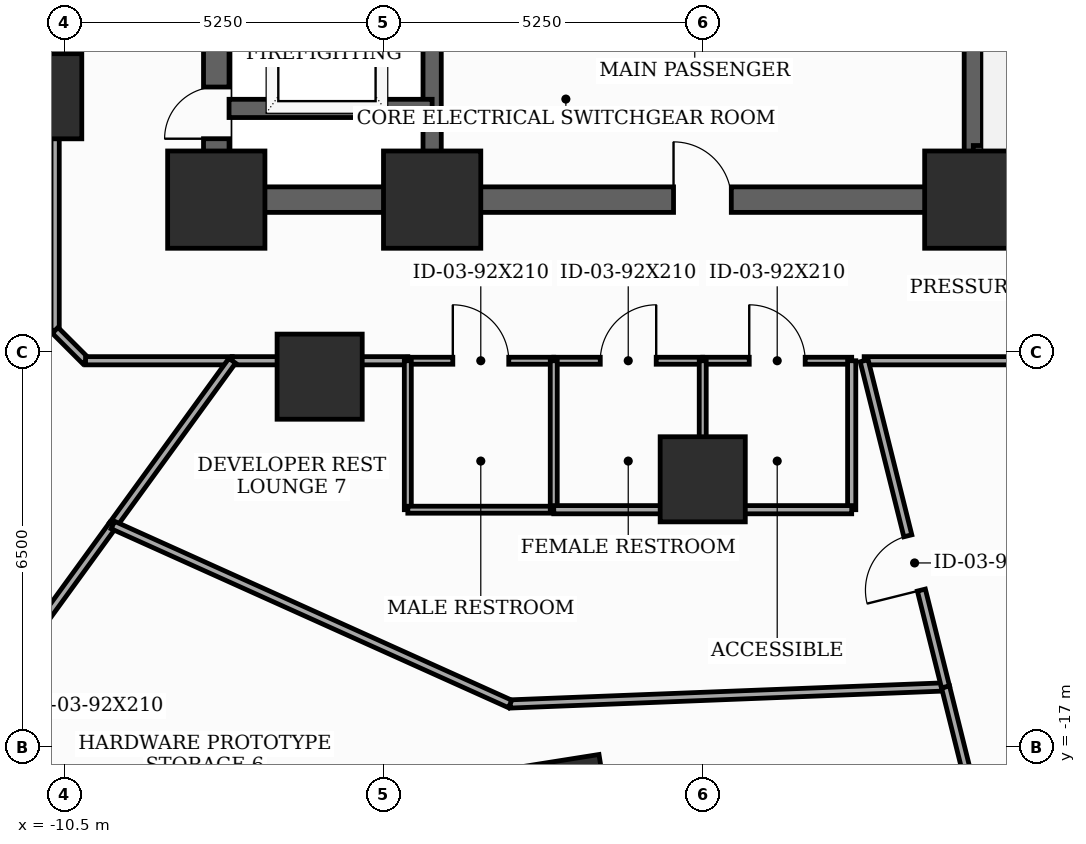
"""IFC4 building model, lengths in metres.
Left out: names, types, materials, properties, quantities, classifications, styles, units other than length and angle.
Written with IfcOpenShell. Run it as: python <this file> out.ifc"""

import sys

from ifc_helpers import new_model, si_unit, direction, frame, frame_2d, origin, origin_2d, place, context, subcontext, project, spatial, rectangle, extrude, element, fill, save


model = new_model("IFC4")
c1 = context("Model", 3, precision=1e-05, world=origin(), true_north=direction((0.0, 1.0)))
c2 = subcontext(c1, "Body", "Model", "MODEL_VIEW")
j1 = project(units=[si_unit("LENGTHUNIT", "METRE"), si_unit("PLANEANGLEUNIT", "RADIAN")], contexts=[c1])
p1 = place(None, origin())
s1 = spatial("IfcSite", under=j1, at=p1, CompositionType="ELEMENT")
p2 = place(p1, origin())
s2 = spatial("IfcBuilding", under=s1, at=p2, CompositionType="ELEMENT")
p3 = place(p2, frame((0.0, 0.0, 59.3)))
s3 = spatial("IfcBuildingStorey", under=s2, at=p3, CompositionType="ELEMENT", Elevation=59.3)
for number, where, z_axis, x_axis in (
    (1, (-8.0, -8.0, 0.0), (0.0, 0.0, 1.0), (1.0, 0.0, 0.0)),
    (2, (-4.45, -8.0, 0.0), (0.0, 0.0, 1.0), (1.0, 0.0, 0.0)),
    (3, (4.45, -8.0, 0.0), (0.0, 0.0, 1.0), (1.0, 0.0, 0.0)),
):
    element("IfcColumn", number, at=place(p3, frame(where, z_axis=z_axis, x_axis=x_axis)), inside=s3, PredefinedType="COLUMN", context=c2, shape_type="SweptSolid", body=[
        extrude(rectangle(XDim=1.6, YDim=1.6, at=origin_2d()), origin(), (0.0, 0.0, 1.0), 3.7),
    ])
for number, where, z_axis, x_axis in (
    (4, (-10.912, -6.3, 0.0), (0.0, 0.0, 1.0), (1.0, 0.0, 0.0)),
    (5, (-6.3, -10.912, 0.0), (0.0, 0.0, 1.0), (1.0, 0.0, 0.0)),
    (6, (0.0, -12.6, 0.0), (0.0, 0.0, 1.0), (1.0, 0.0, 0.0)),
    (7, (-2.288, -17.927, 0.0), (0.0, 0.0, 1.0), (0.988, 0.156, 0.0)),
):
    element("IfcColumn", number, at=place(p3, frame(where, z_axis=z_axis, x_axis=x_axis)), inside=s3, PredefinedType="COLUMN", context=c2, shape_type="SweptSolid", body=[
        extrude(rectangle(XDim=1.4, YDim=1.4, at=origin_2d()), origin(), (0.0, 0.0, 1.0), 3.7),
    ])
p4 = place(p3, frame((-8.0, -8.0, 0.0), z_axis=(0.0, 0.0, 1.0), x_axis=(0.0, 1.0, 0.0)))
e8 = element("IfcWall", 8, at=p4, inside=s3, PredefinedType="SHEAR", context=c2, shape_type="SweptSolid", body=[
    extrude(rectangle(XDim=16.0, YDim=0.42, at=frame_2d((8.0, 0.0))), origin(), (0.0, 0.0, 1.0), 3.5),
])
p5 = place(p4, frame((1.002, 0.0, 0.0)))
e9 = element("IfcOpeningElement", 9, at=p5, cuts=e8, PredefinedType="OPENING", context=c2, shape_type="SweptSolid", body=[
    extrude(rectangle(XDim=0.85, YDim=2.02, at=frame_2d((0.425, 1.01))), frame((0.0, 0.22, 0.0), z_axis=(0.0, -1.0, 0.0), x_axis=(1.0, 0.0, 0.0)), (0.0, 0.0, 1.0), 0.44),
])
p6 = place(p4, frame((5.35, 0.0, 0.0)))
e10 = element("IfcOpeningElement", 10, at=p6, cuts=e8, PredefinedType="OPENING", context=c2, shape_type="SweptSolid", body=[
    extrude(rectangle(XDim=1.05, YDim=2.15, at=frame_2d((0.525, 1.075))), frame((0.0, 0.22, 0.0), z_axis=(0.0, -1.0, 0.0), x_axis=(1.0, 0.0, 0.0)), (0.0, 0.0, 1.0), 0.44),
])
p7 = place(p3, frame((-8.0, -8.0, 0.0), z_axis=(0.0, 0.0, 1.0), x_axis=(1.0, 0.0, 0.0)))
e11 = element("IfcWall", 11, at=p7, inside=s3, PredefinedType="SHEAR", context=c2, shape_type="SweptSolid", body=[
    extrude(rectangle(XDim=16.0, YDim=0.42, at=frame_2d((8.0, 0.0))), origin(), (0.0, 0.0, 1.0), 3.5),
])
p8 = place(p7, frame((7.52, 0.0, 0.0)))
e12 = element("IfcOpeningElement", 12, at=p8, cuts=e11, PredefinedType="OPENING", context=c2, shape_type="SweptSolid", body=[
    extrude(rectangle(XDim=0.95, YDim=2.1, at=frame_2d((0.475, 1.05))), frame((0.0, 0.22, 0.0), z_axis=(0.0, -1.0, 0.0), x_axis=(1.0, 0.0, 0.0)), (0.0, 0.0, 1.0), 0.44),
])
for number, where, z_axis, x_axis in (
    (13, (-4.45, -7.79, 0.0), (0.0, 0.0, 1.0), (0.0, 1.0, 0.0)),
    (14, (4.45, -7.79, 0.0), (0.0, 0.0, 1.0), (0.0, 1.0, 0.0)),
):
    element("IfcWall", number, at=place(p3, frame(where, z_axis=z_axis, x_axis=x_axis)), inside=s3, PredefinedType="SHEAR", context=c2, shape_type="SweptSolid", body=[
        extrude(rectangle(XDim=15.58, YDim=0.3, at=frame_2d((7.79, 0.0))), origin(), (0.0, 0.0, 1.0), 3.5),
    ])
p9 = place(p3, frame((4.45, -7.26, 0.0), z_axis=(0.0, 0.0, 1.0), x_axis=(1.0, 0.0, 0.0)))
e15 = element("IfcWall", 15, at=p9, inside=s3, PredefinedType="SHEAR", context=c2, shape_type="SweptSolid", body=[
    extrude(rectangle(XDim=3.55, YDim=0.3, at=frame_2d((1.775, 0.0))), origin(), (0.0, 0.0, 1.0), 3.5),
])
p10 = place(p3, frame((-7.79, -6.5, 0.0), z_axis=(0.0, 0.0, 1.0), x_axis=(1.0, 0.0, 0.0)))
e16 = element("IfcWall", 16, at=p10, inside=s3, PredefinedType="SHEAR", context=c2, shape_type="SweptSolid", body=[
    extrude(rectangle(XDim=3.34, YDim=0.3, at=frame_2d((1.67, 0.0))), origin(), (0.0, 0.0, 1.0), 3.5),
])
p11 = place(p3, frame((-19.613, -6.394, 0.0), z_axis=(0.0, 0.0, 1.0), x_axis=(0.96591410887, 0.258862771148, 0.0)))
e17 = element("IfcWall", 17, at=p11, inside=s3, PredefinedType="PARTITIONING", context=c2, shape_type="SweptSolid", body=[
    extrude(rectangle(XDim=9.28, YDim=0.135, at=frame_2d((4.64, 0.0))), origin(), (0.0, 0.0, 1.0), 2.785),
])
p12 = place(p3, frame((-10.65, -3.992, 0.0), z_axis=(0.0, 0.0, 1.0), x_axis=(0.0, -1.0, 0.0)))
e18 = element("IfcWall", 18, at=p12, inside=s3, PredefinedType="PARTITIONING", context=c2, shape_type="SweptSolid", body=[
    extrude(rectangle(XDim=6.158, YDim=0.135, at=frame_2d((3.079, 0.0))), origin(), (0.0, 0.0, 1.0), 2.785),
])
p13 = place(p3, frame((-10.65, -10.15, 0.0), z_axis=(0.0, 0.0, 1.0), x_axis=(0.707106781187, -0.707106781187, 0.0)))
e19 = element("IfcWall", 19, at=p13, inside=s3, PredefinedType="PARTITIONING", context=c2, shape_type="SweptSolid", body=[
    extrude(rectangle(XDim=0.707, YDim=0.135, at=frame_2d((0.354, 0.0))), origin(), (0.0, 0.0, 1.0), 3.5),
])
p14 = place(p3, frame((-10.15, -10.65, 0.0), z_axis=(0.0, 0.0, 1.0), x_axis=(1.0, 0.0, 0.0)))
e20 = element("IfcWall", 20, at=p14, inside=s3, PredefinedType="PARTITIONING", context=c2, shape_type="SweptSolid", body=[
    extrude(rectangle(XDim=2.412, YDim=0.135, at=frame_2d((1.206, 0.0))), origin(), (0.0, 0.0, 1.0), 3.5),
])
p15 = place(p3, frame((-4.85, -10.65, 0.0), z_axis=(0.0, 0.0, 1.0), x_axis=(1.0, 0.0, 0.0)))
e21 = element("IfcWall", 21, at=p15, inside=s3, PredefinedType="PARTITIONING", context=c2, shape_type="SweptSolid", body=[
    extrude(rectangle(XDim=2.4, YDim=0.115, at=frame_2d((1.2, 0.0))), origin(), (0.0, 0.0, 1.0), 3.5),
])
p16 = place(p15, frame((0.74, 0.0, 0.0)))
e22 = element("IfcOpeningElement", 22, at=p16, cuts=e21, PredefinedType="OPENING", context=c2, shape_type="SweptSolid", body=[
    extrude(rectangle(XDim=0.92, YDim=2.1, at=frame_2d((0.46, 1.05))), frame((0.0, 0.067, 0.0), z_axis=(0.0, -1.0, 0.0), x_axis=(1.0, 0.0, 0.0)), (0.0, 0.0, 1.0), 0.135),
])
p17 = place(p3, frame((-7.738, -10.65, 0.0), z_axis=(0.0, 0.0, 1.0), x_axis=(1.0, 0.0, 0.0)))
e23 = element("IfcWall", 23, at=p17, inside=s3, PredefinedType="PARTITIONING", context=c2, shape_type="SweptSolid", body=[
    extrude(rectangle(XDim=2.888, YDim=0.135, at=frame_2d((1.444, 0.0))), origin(), (0.0, 0.0, 1.0), 2.785),
])
p18 = place(p3, frame((-2.45, -10.65, 0.0), z_axis=(0.0, 0.0, 1.0), x_axis=(1.0, 0.0, 0.0)))
e24 = element("IfcWall", 24, at=p18, inside=s3, PredefinedType="PARTITIONING", context=c2, shape_type="SweptSolid", body=[
    extrude(rectangle(XDim=2.45, YDim=0.115, at=frame_2d((1.225, 0.0))), origin(), (0.0, 0.0, 1.0), 2.785),
])
p19 = place(p18, frame((0.765, 0.0, 0.0)))
e25 = element("IfcOpeningElement", 25, at=p19, cuts=e24, PredefinedType="OPENING", context=c2, shape_type="SweptSolid", body=[
    extrude(rectangle(XDim=0.92, YDim=2.1, at=frame_2d((0.46, 1.05))), frame((0.0, 0.067, 0.0), z_axis=(0.0, -1.0, 0.0), x_axis=(1.0, 0.0, 0.0)), (0.0, 0.0, 1.0), 0.135),
])
p20 = place(p3, frame((0.0, -10.65, 0.0), z_axis=(0.0, 0.0, 1.0), x_axis=(1.0, 0.0, 0.0)))
e26 = element("IfcWall", 26, at=p20, inside=s3, PredefinedType="PARTITIONING", context=c2, shape_type="SweptSolid", body=[
    extrude(rectangle(XDim=2.45, YDim=0.115, at=frame_2d((1.225, 0.0))), origin(), (0.0, 0.0, 1.0), 3.5),
])
p21 = place(p20, frame((0.765, 0.0, 0.0)))
e27 = element("IfcOpeningElement", 27, at=p21, cuts=e26, PredefinedType="OPENING", context=c2, shape_type="SweptSolid", body=[
    extrude(rectangle(XDim=0.92, YDim=2.1, at=frame_2d((0.46, 1.05))), frame((0.0, 0.067, 0.0), z_axis=(0.0, -1.0, 0.0), x_axis=(1.0, 0.0, 0.0)), (0.0, 0.0, 1.0), 0.135),
])
p22 = place(p3, frame((2.655, -10.65, 0.0), z_axis=(0.0, 0.0, 1.0), x_axis=(1.0, 0.0, 0.0)))
e28 = element("IfcWall", 28, at=p22, inside=s3, PredefinedType="PARTITIONING", context=c2, shape_type="SweptSolid", body=[
    extrude(rectangle(XDim=7.495, YDim=0.135, at=frame_2d((3.748, 0.0))), origin(), (0.0, 0.0, 1.0), 2.785),
])
p23 = place(p3, frame((-15.393, -21.187, 0.0), z_axis=(0.0, 0.0, 1.0), x_axis=(0.587736917223, 0.809052109653, 0.0)))
e29 = element("IfcWall", 29, at=p23, inside=s3, PredefinedType="PARTITIONING", context=c2, shape_type="SweptSolid", body=[
    extrude(rectangle(XDim=9.684, YDim=0.135, at=frame_2d((4.842, 0.0))), origin(), (0.0, 0.0, 1.0), 2.935),
])
p24 = place(p23, frame((5.544, 0.0, 0.0)))
e30 = element("IfcOpeningElement", 30, at=p24, cuts=e29, PredefinedType="OPENING", context=c2, shape_type="SweptSolid", body=[
    extrude(rectangle(XDim=0.92, YDim=2.1, at=frame_2d((0.46, 1.05))), frame((0.0, 0.077, 0.0), z_axis=(0.0, -1.0, 0.0), x_axis=(1.0, 0.0, 0.0)), (0.0, 0.0, 1.0), 0.155),
])
p25 = place(p3, frame((-9.701, -13.352, 0.0), z_axis=(0.0, 0.0, 1.0), x_axis=(0.587719574609, 0.809064707932, 0.0)))
e31 = element("IfcWall", 31, at=p25, inside=s3, PredefinedType="PARTITIONING", context=c2, shape_type="SweptSolid", body=[
    extrude(rectangle(XDim=3.34, YDim=0.135, at=frame_2d((1.67, 0.0))), origin(), (0.0, 0.0, 1.0), 3.5),
])
p26 = place(p3, frame((3.993, -16.014, 0.0), z_axis=(0.0, 0.0, 1.0), x_axis=(-0.999230720769, -0.039216918185, 0.0)))
e32 = element("IfcWall", 32, at=p26, inside=s3, PredefinedType="PARTITIONING", context=c2, shape_type="SweptSolid", body=[
    extrude(rectangle(XDim=7.166, YDim=0.135, at=frame_2d((3.583, 0.0))), origin(), (0.0, 0.0, 1.0), 2.785),
])
p27 = place(p3, frame((-3.167, -16.295, 0.0), z_axis=(0.0, 0.0, 1.0), x_axis=(-0.911785675506, 0.410666387645, 0.0)))
e33 = element("IfcWall", 33, at=p27, inside=s3, PredefinedType="PARTITIONING", context=c2, shape_type="SweptSolid", body=[
    extrude(rectangle(XDim=7.166, YDim=0.135, at=frame_2d((3.583, 0.0))), origin(), (0.0, 0.0, 1.0), 2.785),
])
p28 = place(p3, frame((4.497, -18.037, 0.0), z_axis=(0.0, 0.0, 1.0), x_axis=(-0.24157117672, 0.970383102995, 0.0)))
e34 = element("IfcWall", 34, at=p28, inside=s3, PredefinedType="PARTITIONING", context=c2, shape_type="SweptSolid", body=[
    extrude(rectangle(XDim=2.085, YDim=0.135, at=frame_2d((1.042, 0.0))), origin(), (0.0, 0.0, 1.0), 2.935),
])
p29 = place(p3, frame((-4.85, -10.65, 0.0), z_axis=(0.0, 0.0, 1.0), x_axis=(0.0, -1.0, 0.0)))
e35 = element("IfcWall", 35, at=p29, inside=s3, PredefinedType="PARTITIONING", context=c2, shape_type="SweptSolid", body=[
    extrude(rectangle(XDim=2.45, YDim=0.115, at=frame_2d((1.225, 0.0))), origin(), (0.0, 0.0, 1.0), 2.785),
])
p30 = place(p3, frame((-4.85, -13.1, 0.0), z_axis=(0.0, 0.0, 1.0), x_axis=(1.0, 0.0, 0.0)))
e36 = element("IfcWall", 36, at=p30, inside=s3, PredefinedType="PARTITIONING", context=c2, shape_type="SweptSolid", body=[
    extrude(rectangle(XDim=2.4, YDim=0.115, at=frame_2d((1.2, 0.0))), origin(), (0.0, 0.0, 1.0), 3.5),
])
p31 = place(p3, frame((-2.45, -13.1, 0.0), z_axis=(0.0, 0.0, 1.0), x_axis=(0.0, 1.0, 0.0)))
e37 = element("IfcWall", 37, at=p31, inside=s3, PredefinedType="PARTITIONING", context=c2, shape_type="SweptSolid", body=[
    extrude(rectangle(XDim=2.45, YDim=0.115, at=frame_2d((1.225, 0.0))), origin(), (0.0, 0.0, 1.0), 2.785),
])
p32 = place(p3, frame((0.0, -13.1, 0.0), z_axis=(0.0, 0.0, 1.0), x_axis=(-1.0, 0.0, 0.0)))
e38 = element("IfcWall", 38, at=p32, inside=s3, PredefinedType="PARTITIONING", context=c2, shape_type="SweptSolid", body=[
    extrude(rectangle(XDim=2.45, YDim=0.135, at=frame_2d((1.225, 0.0))), origin(), (0.0, 0.0, 1.0), 2.785),
])
p33 = place(p3, frame((2.45, -10.65, 0.0), z_axis=(0.0, 0.0, 1.0), x_axis=(0.0, -1.0, 0.0)))
e39 = element("IfcWall", 39, at=p33, inside=s3, PredefinedType="PARTITIONING", context=c2, shape_type="SweptSolid", body=[
    extrude(rectangle(XDim=2.45, YDim=0.135, at=frame_2d((1.225, 0.0))), origin(), (0.0, 0.0, 1.0), 2.785),
])
p34 = place(p3, frame((2.45, -13.1, 0.0), z_axis=(0.0, 0.0, 1.0), x_axis=(-1.0, 0.0, 0.0)))
e40 = element("IfcWall", 40, at=p34, inside=s3, PredefinedType="PARTITIONING", context=c2, shape_type="SweptSolid", body=[
    extrude(rectangle(XDim=2.45, YDim=0.135, at=frame_2d((1.225, 0.0))), origin(), (0.0, 0.0, 1.0), 2.785),
])
p35 = place(p3, frame((3.993, -16.014, 0.0), z_axis=(0.0, 0.0, 1.0), x_axis=(-0.242005649473, 0.97027484025, 0.0)))
e41 = element("IfcWall", 41, at=p35, inside=s3, PredefinedType="PARTITIONING", context=c2, shape_type="SweptSolid", body=[
    extrude(rectangle(XDim=5.528, YDim=0.135, at=frame_2d((2.764, 0.0))), origin(), (0.0, 0.0, 1.0), 2.785),
])
p36 = place(p35, frame((1.641, 0.0, 0.0)))
e42 = element("IfcOpeningElement", 42, at=p36, cuts=e41, PredefinedType="OPENING", context=c2, shape_type="SweptSolid", body=[
    extrude(rectangle(XDim=0.92, YDim=2.1, at=frame_2d((0.46, 1.05))), frame((0.0, 0.077, 0.0), z_axis=(0.0, -1.0, 0.0), x_axis=(1.0, 0.0, 0.0)), (0.0, 0.0, 1.0), 0.155),
])
p37 = place(p3, frame((0.0, -13.1, 0.0), z_axis=(0.0, 0.0, 1.0), x_axis=(0.0, 1.0, 0.0)))
e43 = element("IfcWall", 43, at=p37, inside=s3, PredefinedType="PARTITIONING", context=c2, shape_type="SweptSolid", body=[
    extrude(rectangle(XDim=2.45, YDim=0.115, at=frame_2d((1.225, 0.0))), origin(), (0.0, 0.0, 1.0), 2.785),
])
p38 = place(p5, origin())
e44 = element("IfcDoor", 44, at=p38, inside=s3, OperationType="SINGLE_SWING_LEFT", PredefinedType="TRAPDOOR", context=c2, shape_type="SweptSolid", body=[
    extrude(rectangle(XDim=0.85, YDim=2.02, at=frame_2d((0.425, 1.01))), frame((0.0, 0.025, 0.0), z_axis=(0.0, -1.0, 0.0), x_axis=(1.0, 0.0, 0.0)), (0.0, 0.0, 1.0), 0.05),
])
fill(e9, e44)
p39 = place(p8, origin())
e45 = element("IfcDoor", 45, at=p39, inside=s3, OperationType="SINGLE_SWING_LEFT", PredefinedType="DOOR", context=c2, shape_type="SweptSolid", body=[
    extrude(rectangle(XDim=0.95, YDim=2.1, at=frame_2d((0.475, 1.05))), frame((0.0, 0.025, 0.0), z_axis=(0.0, -1.0, 0.0), x_axis=(1.0, 0.0, 0.0)), (0.0, 0.0, 1.0), 0.05),
])
fill(e12, e45)
p40 = place(p16, origin())
e46 = element("IfcDoor", 46, at=p40, inside=s3, OperationType="SINGLE_SWING_LEFT", PredefinedType="DOOR", context=c2, shape_type="SweptSolid", body=[
    extrude(rectangle(XDim=0.92, YDim=2.1, at=frame_2d((0.46, 1.05))), frame((0.0, 0.025, 0.0), z_axis=(0.0, -1.0, 0.0), x_axis=(1.0, 0.0, 0.0)), (0.0, 0.0, 1.0), 0.05),
])
fill(e22, e46)
p41 = place(p19, origin())
e47 = element("IfcDoor", 47, at=p41, inside=s3, OperationType="SINGLE_SWING_RIGHT", PredefinedType="DOOR", context=c2, shape_type="SweptSolid", body=[
    extrude(rectangle(XDim=0.92, YDim=2.1, at=frame_2d((0.46, 1.05))), frame((0.0, 0.025, 0.0), z_axis=(0.0, -1.0, 0.0), x_axis=(1.0, 0.0, 0.0)), (0.0, 0.0, 1.0), 0.05),
])
fill(e25, e47)
p42 = place(p21, origin())
e48 = element("IfcDoor", 48, at=p42, inside=s3, OperationType="SINGLE_SWING_LEFT", PredefinedType="DOOR", context=c2, shape_type="SweptSolid", body=[
    extrude(rectangle(XDim=0.92, YDim=2.1, at=frame_2d((0.46, 1.05))), frame((0.0, 0.025, 0.0), z_axis=(0.0, -1.0, 0.0), x_axis=(1.0, 0.0, 0.0)), (0.0, 0.0, 1.0), 0.05),
])
fill(e27, e48)
p43 = place(p36, origin())
e49 = element("IfcDoor", 49, at=p43, inside=s3, OperationType="SINGLE_SWING_LEFT", PredefinedType="DOOR", context=c2, shape_type="SweptSolid", body=[
    extrude(rectangle(XDim=0.92, YDim=2.1, at=frame_2d((0.46, 1.05))), frame((0.0, 0.025, 0.0), z_axis=(0.0, -1.0, 0.0), x_axis=(1.0, 0.0, 0.0)), (0.0, 0.0, 1.0), 0.05),
])
fill(e42, e49)
save(model, sys.argv[1])
